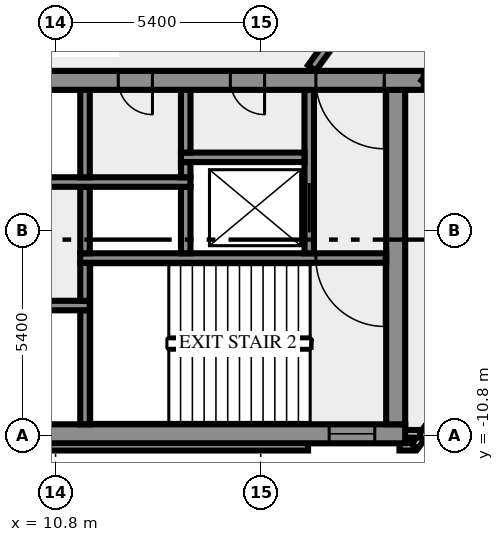
"""IFC4 building model, lengths in metres.
Left out: names, types, materials, properties, quantities, classifications, styles, units other than length and angle.
Written with IfcOpenShell. Run it as: python <this file> out.ifc"""

import sys

from ifc_helpers import new_model, si_unit, direction, frame, frame_2d, origin, place, context, subcontext, project, spatial, rectangle, extrude, element, fill, save


model = new_model("IFC4")
c1 = context("Model", 3, precision=1e-05, world=origin(), true_north=direction((0.0, 1.0)))
c2 = subcontext(c1, "Body", "Model", "MODEL_VIEW")
j1 = project(units=[si_unit("LENGTHUNIT", "METRE"), si_unit("PLANEANGLEUNIT", "RADIAN")], contexts=[c1])
p1 = place(None, origin())
s1 = spatial("IfcSite", under=j1, at=p1, CompositionType="ELEMENT")
p2 = place(p1, origin())
s2 = spatial("IfcBuilding", under=s1, at=p2, CompositionType="ELEMENT")
p3 = place(p2, frame((0.0, 0.0, 31.0)))
s3 = spatial("IfcBuildingStorey", under=s2, at=p3, CompositionType="ELEMENT", Elevation=31.0)
p4 = place(p3, frame((-17.444, -11.088, 0.0), z_axis=(0.0, 0.0, 1.0), x_axis=(1.0, 0.0, 0.0)))
e1 = element("IfcWall", 1, at=p4, inside=s3, PredefinedType="SOLIDWALL", context=c2, shape_type="SweptSolid", body=[
    extrude(rectangle(XDim=34.888, YDim=0.2, at=frame_2d((17.444, 0.0))), origin(), (0.0, 0.0, 1.0), 3.65),
])
p5 = place(p3, frame((19.85, -11.088, 0.0), z_axis=(0.0, 0.0, 1.0), x_axis=(1.0, 0.0, 0.0)))
e2 = element("IfcWall", 2, at=p5, inside=s3, PredefinedType="SOLIDWALL", context=c2, shape_type="SweptSolid", body=[
    extrude(rectangle(XDim=0.406, YDim=0.2, at=frame_2d((0.203, 0.0))), origin(), (0.0, 0.0, 1.0), 3.65),
])
p6 = place(p3, frame((20.253, -11.083, 0.0), z_axis=(0.0, 0.0, 1.0), x_axis=(0.587766567315, 0.809030569476, 0.0)))
e3 = element("IfcWall", 3, at=p6, inside=s3, PredefinedType="SOLIDWALL", context=c2, shape_type="SweptSolid", body=[
    extrude(rectangle(XDim=2.688, YDim=0.2, at=frame_2d((1.344, 0.0))), origin(), (0.0, 0.0, 1.0), 3.65),
])
p7 = place(p3, frame((19.98, -10.75, 0.0), z_axis=(0.0, 0.0, 1.0), x_axis=(1.0, 0.0, 0.0)))
e4 = element("IfcWall", 4, at=p7, inside=s3, PredefinedType="SOLIDWALL", context=c2, shape_type="SweptSolid", body=[
    extrude(rectangle(XDim=0.417, YDim=0.2, at=frame_2d((0.208, 0.0))), origin(), (0.0, 0.0, 1.0), 3.65),
])
p8 = place(p3, frame((-20.0, -10.75, 0.0), z_axis=(0.0, 0.0, 1.0), x_axis=(1.0, 0.0, 0.0)))
e5 = element("IfcWall", 5, at=p8, inside=s3, PredefinedType="SHEAR", context=c2, shape_type="SweptSolid", body=[
    extrude(rectangle(XDim=40.0, YDim=0.5, at=frame_2d((20.0, 0.0))), origin(), (0.0, 0.0, 1.0), 3.65),
])
p9 = place(p8, frame((0.8, 0.0, 1.0)))
e6 = element("IfcOpeningElement", 6, at=p9, cuts=e5, PredefinedType="OPENING", context=c2, shape_type="SweptSolid", body=[
    extrude(rectangle(XDim=1.2, YDim=1.2, at=frame_2d((0.6, 0.6))), frame((0.0, 0.26, 0.0), z_axis=(0.0, -1.0, 0.0), x_axis=(1.0, 0.0, 0.0)), (0.0, 0.0, 1.0), 0.52),
])
p10 = place(p8, frame((38.0, 0.0, 1.0)))
e7 = element("IfcOpeningElement", 7, at=p10, cuts=e5, PredefinedType="OPENING", context=c2, shape_type="SweptSolid", body=[
    extrude(rectangle(XDim=1.2, YDim=1.2, at=frame_2d((0.6, 0.6))), frame((0.0, 0.26, 0.0), z_axis=(0.0, -1.0, 0.0), x_axis=(1.0, 0.0, 0.0)), (0.0, 0.0, 1.0), 0.52),
])
p11 = place(p3, frame((11.575, -10.5, 0.0), z_axis=(0.0, 0.0, 1.0), x_axis=(0.0, 1.0, 0.0)))
e8 = element("IfcWall", 8, at=p11, inside=s3, PredefinedType="SHEAR", context=c2, shape_type="SweptSolid", body=[
    extrude(rectangle(XDim=3.0, YDim=0.25, at=frame_2d((1.5, 0.0))), origin(), (0.0, 0.0, 1.0), 3.65),
])
p12 = place(p3, frame((19.75, -10.5, 0.0), z_axis=(0.0, 0.0, 1.0), x_axis=(0.0, 1.0, 0.0)))
e9 = element("IfcWall", 9, at=p12, inside=s3, PredefinedType="SHEAR", context=c2, shape_type="SweptSolid", body=[
    extrude(rectangle(XDim=8.8, YDim=0.5, at=frame_2d((4.4, 0.0))), origin(), (0.0, 0.0, 1.0), 3.65),
])
p13 = place(p3, frame((11.7, -7.375, 0.0), z_axis=(0.0, 0.0, 1.0), x_axis=(-1.0, 0.0, 0.0)))
e10 = element("IfcWall", 10, at=p13, inside=s3, PredefinedType="SHEAR", context=c2, shape_type="SweptSolid", body=[
    extrude(rectangle(XDim=23.4, YDim=0.25, at=frame_2d((11.7, 0.0))), origin(), (0.0, 0.0, 1.0), 3.65),
])
p14 = place(p13, frame((21.45, 0.0, 0.0)))
e11 = element("IfcOpeningElement", 11, at=p14, cuts=e10, PredefinedType="OPENING", context=c2, shape_type="SweptSolid", body=[
    extrude(rectangle(XDim=1.1, YDim=2.1, at=frame_2d((0.55, 1.05))), frame((0.0, 0.135, 0.0), z_axis=(0.0, -1.0, 0.0), x_axis=(1.0, 0.0, 0.0)), (0.0, 0.0, 1.0), 0.27),
])
p15 = place(p13, frame((18.95, 0.0, 0.0)))
e12 = element("IfcOpeningElement", 12, at=p15, cuts=e10, PredefinedType="OPENING", context=c2, shape_type="SweptSolid", body=[
    extrude(rectangle(XDim=1.1, YDim=2.1, at=frame_2d((0.55, 1.05))), frame((0.0, 0.135, 0.0), z_axis=(0.0, -1.0, 0.0), x_axis=(1.0, 0.0, 0.0)), (0.0, 0.0, 1.0), 0.27),
])
p16 = place(p13, frame((16.45, 0.0, 0.0)))
e13 = element("IfcOpeningElement", 13, at=p16, cuts=e10, PredefinedType="OPENING", context=c2, shape_type="SweptSolid", body=[
    extrude(rectangle(XDim=1.1, YDim=2.1, at=frame_2d((0.55, 1.05))), frame((0.0, 0.135, 0.0), z_axis=(0.0, -1.0, 0.0), x_axis=(1.0, 0.0, 0.0)), (0.0, 0.0, 1.0), 0.27),
])
p17 = place(p13, frame((14.4, 0.0, 0.0)))
e14 = element("IfcOpeningElement", 14, at=p17, cuts=e10, PredefinedType="OPENING", context=c2, shape_type="SweptSolid", body=[
    extrude(rectangle(XDim=0.9, YDim=2.1, at=frame_2d((0.45, 1.05))), frame((0.0, 0.135, 0.0), z_axis=(0.0, -1.0, 0.0), x_axis=(1.0, 0.0, 0.0)), (0.0, 0.0, 1.0), 0.27),
])
p18 = place(p13, frame((12.5, 0.0, 0.0)))
e15 = element("IfcOpeningElement", 15, at=p18, cuts=e10, PredefinedType="OPENING", context=c2, shape_type="SweptSolid", body=[
    extrude(rectangle(XDim=0.9, YDim=2.1, at=frame_2d((0.45, 1.05))), frame((0.0, 0.135, 0.0), z_axis=(0.0, -1.0, 0.0), x_axis=(1.0, 0.0, 0.0)), (0.0, 0.0, 1.0), 0.27),
])
p19 = place(p13, frame((10.6, 0.0, 0.0)))
e16 = element("IfcOpeningElement", 16, at=p19, cuts=e10, PredefinedType="OPENING", context=c2, shape_type="SweptSolid", body=[
    extrude(rectangle(XDim=0.9, YDim=2.1, at=frame_2d((0.45, 1.05))), frame((0.0, 0.135, 0.0), z_axis=(0.0, -1.0, 0.0), x_axis=(1.0, 0.0, 0.0)), (0.0, 0.0, 1.0), 0.27),
])
p20 = place(p3, frame((11.575, -7.25, 0.0), z_axis=(0.0, 0.0, 1.0), x_axis=(0.0, 1.0, 0.0)))
e17 = element("IfcWall", 17, at=p20, inside=s3, PredefinedType="SHEAR", context=c2, shape_type="SweptSolid", body=[
    extrude(rectangle(XDim=1.0, YDim=0.25, at=frame_2d((0.5, 0.0))), origin(), (0.0, 0.0, 1.0), 3.65),
])
p21 = place(p3, frame((19.5, -6.125, 0.0), z_axis=(0.0, 0.0, 1.0), x_axis=(-1.0, 0.0, 0.0)))
e18 = element("IfcWall", 18, at=p21, inside=s3, PredefinedType="SHEAR", context=c2, shape_type="SweptSolid", body=[
    extrude(rectangle(XDim=8.05, YDim=0.25, at=frame_2d((4.025, 0.0))), origin(), (0.0, 0.0, 1.0), 3.65),
])
p22 = place(p21, frame((0.05, 0.0, 0.0)))
e19 = element("IfcOpeningElement", 19, at=p22, cuts=e18, PredefinedType="OPENING", context=c2, shape_type="SweptSolid", body=[
    extrude(rectangle(XDim=1.8, YDim=2.1, at=frame_2d((0.9, 1.05))), frame((0.0, 0.135, 0.0), z_axis=(0.0, -1.0, 0.0), x_axis=(1.0, 0.0, 0.0)), (0.0, 0.0, 1.0), 0.27),
])
for number, where, z_axis, x_axis in (
    (20, (11.575, -6.0, 0.0), (0.0, 0.0, 1.0), (0.0, 1.0, 0.0)),
    (21, (14.225, -6.0, 0.0), (0.0, 0.0, 1.0), (0.0, 1.0, 0.0)),
):
    element("IfcWall", number, at=place(p3, frame(where, z_axis=z_axis, x_axis=x_axis)), inside=s3, PredefinedType="SHEAR", context=c2, shape_type="SweptSolid", body=[
        extrude(rectangle(XDim=1.75, YDim=0.25, at=frame_2d((0.875, 0.0))), origin(), (0.0, 0.0, 1.0), 3.65),
    ])
p23 = place(p3, frame((17.475, -6.0, 0.0), z_axis=(0.0, 0.0, 1.0), x_axis=(0.0, 1.0, 0.0)))
e22 = element("IfcWall", 22, at=p23, inside=s3, PredefinedType="SHEAR", context=c2, shape_type="SweptSolid", body=[
    extrude(rectangle(XDim=4.3, YDim=0.25, at=frame_2d((2.15, 0.0))), origin(), (0.0, 0.0, 1.0), 3.65),
])
p24 = place(p23, frame((0.55, 0.0, 0.0)))
e23 = element("IfcOpeningElement", 23, at=p24, cuts=e22, PredefinedType="OPENING", context=c2, shape_type="SweptSolid", body=[
    extrude(rectangle(XDim=1.3, YDim=2.1, at=frame_2d((0.65, 1.05))), frame((0.0, 0.135, 0.0), z_axis=(0.0, -1.0, 0.0), x_axis=(1.0, 0.0, 0.0)), (0.0, 0.0, 1.0), 0.27),
])
p25 = place(p3, frame((-0.6, -4.125, 0.0), z_axis=(0.0, 0.0, 1.0), x_axis=(1.0, 0.0, 0.0)))
e24 = element("IfcWall", 24, at=p25, inside=s3, PredefinedType="SHEAR", context=c2, shape_type="SweptSolid", body=[
    extrude(rectangle(XDim=14.95, YDim=0.25, at=frame_2d((7.475, 0.0))), origin(), (0.0, 0.0, 1.0), 3.65),
])
p26 = place(p25, frame((2.75, 0.0, 0.0)))
e25 = element("IfcOpeningElement", 25, at=p26, cuts=e24, PredefinedType="OPENING", context=c2, shape_type="SweptSolid", body=[
    extrude(rectangle(XDim=1.3, YDim=2.1, at=frame_2d((0.65, 1.05))), frame((0.0, 0.135, 0.0), z_axis=(0.0, -1.0, 0.0), x_axis=(1.0, 0.0, 0.0)), (0.0, 0.0, 1.0), 0.27),
])
p27 = place(p3, frame((11.575, -4.0, 0.0), z_axis=(0.0, 0.0, 1.0), x_axis=(0.0, 1.0, 0.0)))
e26 = element("IfcWall", 26, at=p27, inside=s3, PredefinedType="SHEAR", context=c2, shape_type="SweptSolid", body=[
    extrude(rectangle(XDim=2.3, YDim=0.25, at=frame_2d((1.15, 0.0))), origin(), (0.0, 0.0, 1.0), 3.65),
])
p28 = place(p3, frame((14.225, -4.0, 0.0), z_axis=(0.0, 0.0, 1.0), x_axis=(0.0, 1.0, 0.0)))
e27 = element("IfcWall", 27, at=p28, inside=s3, PredefinedType="SHEAR", context=c2, shape_type="SweptSolid", body=[
    extrude(rectangle(XDim=0.4, YDim=0.25, at=frame_2d((0.2, 0.0))), origin(), (0.0, 0.0, 1.0), 3.65),
])
p29 = place(p3, frame((14.1, -3.475, 0.0), z_axis=(0.0, 0.0, 1.0), x_axis=(1.0, 0.0, 0.0)))
e28 = element("IfcWall", 28, at=p29, inside=s3, PredefinedType="SHEAR", context=c2, shape_type="SweptSolid", body=[
    extrude(rectangle(XDim=3.25, YDim=0.25, at=frame_2d((1.625, 0.0))), origin(), (0.0, 0.0, 1.0), 3.65),
])
p30 = place(p3, frame((14.225, -3.35, 0.0), z_axis=(0.0, 0.0, 1.0), x_axis=(0.0, 1.0, 0.0)))
e29 = element("IfcWall", 29, at=p30, inside=s3, PredefinedType="SHEAR", context=c2, shape_type="SweptSolid", body=[
    extrude(rectangle(XDim=1.65, YDim=0.25, at=frame_2d((0.825, 0.0))), origin(), (0.0, 0.0, 1.0), 3.65),
])
p31 = place(p3, frame((20.49, -1.45, 0.0), z_axis=(0.0, 0.0, 1.0), x_axis=(-1.0, 0.0, 0.0)))
e30 = element("IfcWall", 30, at=p31, inside=s3, PredefinedType="SHEAR", context=c2, shape_type="SweptSolid", body=[
    extrude(rectangle(XDim=40.98, YDim=0.5, at=frame_2d((20.49, 0.0))), origin(), (0.0, 0.0, 1.0), 3.65),
])
p32 = place(p31, frame((38.14, 0.0, 0.0)))
e31 = element("IfcOpeningElement", 31, at=p32, cuts=e30, PredefinedType="OPENING", context=c2, shape_type="SweptSolid", body=[
    extrude(rectangle(XDim=1.8, YDim=2.1, at=frame_2d((0.9, 1.05))), frame((0.0, 0.26, 0.0), z_axis=(0.0, -1.0, 0.0), x_axis=(1.0, 0.0, 0.0)), (0.0, 0.0, 1.0), 0.52),
])
p33 = place(p31, frame((36.728, 0.0, 0.0)))
e32 = element("IfcOpeningElement", 32, at=p33, cuts=e30, PredefinedType="OPENING", context=c2, shape_type="SweptSolid", body=[
    extrude(rectangle(XDim=0.8, YDim=2.1, at=frame_2d((0.4, 1.05))), frame((0.0, 0.26, 0.0), z_axis=(0.0, -1.0, 0.0), x_axis=(1.0, 0.0, 0.0)), (0.0, 0.0, 1.0), 0.52),
])
p34 = place(p31, frame((35.153, 0.0, 0.0)))
e33 = element("IfcOpeningElement", 33, at=p34, cuts=e30, PredefinedType="OPENING", context=c2, shape_type="SweptSolid", body=[
    extrude(rectangle(XDim=0.8, YDim=2.1, at=frame_2d((0.4, 1.05))), frame((0.0, 0.26, 0.0), z_axis=(0.0, -1.0, 0.0), x_axis=(1.0, 0.0, 0.0)), (0.0, 0.0, 1.0), 0.52),
])
p35 = place(p31, frame((32.94, 0.0, 0.0)))
e34 = element("IfcOpeningElement", 34, at=p35, cuts=e30, PredefinedType="OPENING", context=c2, shape_type="SweptSolid", body=[
    extrude(rectangle(XDim=0.9, YDim=2.1, at=frame_2d((0.45, 1.05))), frame((0.0, 0.26, 0.0), z_axis=(0.0, -1.0, 0.0), x_axis=(1.0, 0.0, 0.0)), (0.0, 0.0, 1.0), 0.52),
])
p36 = place(p31, frame((21.765, 0.0, 0.0)))
e35 = element("IfcOpeningElement", 35, at=p36, cuts=e30, PredefinedType="OPENING", context=c2, shape_type="SweptSolid", body=[
    extrude(rectangle(XDim=2.0, YDim=2.1, at=frame_2d((1.0, 1.05))), frame((0.0, 0.26, 0.0), z_axis=(0.0, -1.0, 0.0), x_axis=(1.0, 0.0, 0.0)), (0.0, 0.0, 1.0), 0.52),
])
p37 = place(p31, frame((7.14, 0.0, 0.0)))
e36 = element("IfcOpeningElement", 36, at=p37, cuts=e30, PredefinedType="OPENING", context=c2, shape_type="SweptSolid", body=[
    extrude(rectangle(XDim=0.9, YDim=2.1, at=frame_2d((0.45, 1.05))), frame((0.0, 0.26, 0.0), z_axis=(0.0, -1.0, 0.0), x_axis=(1.0, 0.0, 0.0)), (0.0, 0.0, 1.0), 0.52),
])
p38 = place(p31, frame((4.19, 0.0, 0.0)))
e37 = element("IfcOpeningElement", 37, at=p38, cuts=e30, PredefinedType="OPENING", context=c2, shape_type="SweptSolid", body=[
    extrude(rectangle(XDim=0.9, YDim=2.1, at=frame_2d((0.45, 1.05))), frame((0.0, 0.26, 0.0), z_axis=(0.0, -1.0, 0.0), x_axis=(1.0, 0.0, 0.0)), (0.0, 0.0, 1.0), 0.52),
])
p39 = place(p31, frame((1.04, 0.0, 0.0)))
e38 = element("IfcOpeningElement", 38, at=p39, cuts=e30, PredefinedType="OPENING", context=c2, shape_type="SweptSolid", body=[
    extrude(rectangle(XDim=1.8, YDim=2.1, at=frame_2d((0.9, 1.05))), frame((0.0, 0.26, 0.0), z_axis=(0.0, -1.0, 0.0), x_axis=(1.0, 0.0, 0.0)), (0.0, 0.0, 1.0), 0.52),
])
p40 = place(p3, frame((17.545, -1.125, 0.0), z_axis=(0.0, 0.0, 1.0), x_axis=(0.587786323093, 0.809016216391, 0.0)))
e39 = element("IfcWall", 39, at=p40, inside=s3, PredefinedType="SOLIDWALL", context=c2, shape_type="SweptSolid", body=[
    extrude(rectangle(XDim=33.493, YDim=0.25, at=frame_2d((16.747, 0.0))), origin(), (0.0, 0.0, 1.0), 3.65),
])
p41 = place(p40, frame((25.857, 0.0, 0.0)))
e40 = element("IfcOpeningElement", 40, at=p41, cuts=e39, PredefinedType="OPENING", context=c2, shape_type="SweptSolid", body=[
    extrude(rectangle(XDim=0.9, YDim=2.1, at=frame_2d((0.45, 1.05))), frame((0.0, 0.135, 0.0), z_axis=(0.0, -1.0, 0.0), x_axis=(1.0, 0.0, 0.0)), (0.0, 0.0, 1.0), 0.27),
])
p42 = place(p40, frame((24.157, 0.0, 0.0)))
e41 = element("IfcOpeningElement", 41, at=p42, cuts=e39, PredefinedType="OPENING", context=c2, shape_type="SweptSolid", body=[
    extrude(rectangle(XDim=1.0, YDim=2.1, at=frame_2d((0.5, 1.05))), frame((0.0, 0.135, 0.0), z_axis=(0.0, -1.0, 0.0), x_axis=(1.0, 0.0, 0.0)), (0.0, 0.0, 1.0), 0.27),
])
p43 = place(p3, frame((43.467, 30.045, 0.0), z_axis=(0.0, 0.0, 1.0), x_axis=(-0.587784726077, -0.809017376692, 0.0)))
e42 = element("IfcWall", 42, at=p43, inside=s3, PredefinedType="SOLIDWALL", context=c2, shape_type="SweptSolid", body=[
    extrude(rectangle(XDim=39.02, YDim=0.25, at=frame_2d((19.51, 0.0))), origin(), (0.0, 0.0, 1.0), 3.65),
])
p44 = place(p43, frame((37.588, 0.0, 0.0)))
e43 = element("IfcOpeningElement", 43, at=p44, cuts=e42, PredefinedType="OPENING", context=c2, shape_type="SweptSolid", body=[
    extrude(rectangle(XDim=0.9, YDim=2.1, at=frame_2d((0.45, 1.05))), frame((0.0, 0.135, 0.0), z_axis=(0.0, -1.0, 0.0), x_axis=(1.0, 0.0, 0.0)), (0.0, 0.0, 1.0), 0.27),
])
p45 = place(p43, frame((20.855, 0.0, 0.0)))
e44 = element("IfcOpeningElement", 44, at=p45, cuts=e42, PredefinedType="OPENING", context=c2, shape_type="SweptSolid", body=[
    extrude(rectangle(XDim=0.9, YDim=2.1, at=frame_2d((0.45, 1.05))), frame((0.0, 0.135, 0.0), z_axis=(0.0, -1.0, 0.0), x_axis=(1.0, 0.0, 0.0)), (0.0, 0.0, 1.0), 0.27),
])
p46 = place(p43, frame((7.355, 0.0, 0.0)))
e45 = element("IfcOpeningElement", 45, at=p46, cuts=e42, PredefinedType="OPENING", context=c2, shape_type="SweptSolid", body=[
    extrude(rectangle(XDim=0.9, YDim=2.1, at=frame_2d((0.45, 1.05))), frame((0.0, 0.135, 0.0), z_axis=(0.0, -1.0, 0.0), x_axis=(1.0, 0.0, 0.0)), (0.0, 0.0, 1.0), 0.27),
])
p47 = place(p43, frame((11.404, 0.0, 0.0)))
e46 = element("IfcOpeningElement", 46, at=p47, cuts=e42, PredefinedType="OPENING", context=c2, shape_type="SweptSolid", body=[
    extrude(rectangle(XDim=0.9, YDim=2.1, at=frame_2d((0.45, 1.05))), frame((0.0, 0.135, 0.0), z_axis=(0.0, -1.0, 0.0), x_axis=(1.0, 0.0, 0.0)), (0.0, 0.0, 1.0), 0.27),
])
p48 = place(p43, frame((0.604, 0.0, 0.0)))
e47 = element("IfcOpeningElement", 47, at=p48, cuts=e42, PredefinedType="OPENING", context=c2, shape_type="SweptSolid", body=[
    extrude(rectangle(XDim=0.9, YDim=2.1, at=frame_2d((0.45, 1.05))), frame((0.0, 0.135, 0.0), z_axis=(0.0, -1.0, 0.0), x_axis=(1.0, 0.0, 0.0)), (0.0, 0.0, 1.0), 0.27),
])
p49 = place(p43, frame((22.455, 0.0, 0.0)))
e48 = element("IfcOpeningElement", 48, at=p49, cuts=e42, PredefinedType="OPENING", context=c2, shape_type="SweptSolid", body=[
    extrude(rectangle(XDim=0.9, YDim=2.1, at=frame_2d((0.45, 1.05))), frame((0.0, 0.135, 0.0), z_axis=(0.0, -1.0, 0.0), x_axis=(1.0, 0.0, 0.0)), (0.0, 0.0, 1.0), 0.27),
])
p50 = place(p10, origin())
e49 = element("IfcWindow", 49, at=p50, inside=s3, PartitioningType="SINGLE_PANEL", PredefinedType="WINDOW", context=c2, shape_type="SweptSolid", body=[
    extrude(rectangle(XDim=1.2, YDim=1.2, at=frame_2d((0.6, 0.6))), frame((0.0, 0.03, 0.0), z_axis=(0.0, -1.0, 0.0), x_axis=(1.0, 0.0, 0.0)), (0.0, 0.0, 1.0), 0.06),
])
fill(e7, e49)
p51 = place(p22, origin())
e50 = element("IfcDoor", 50, at=p51, inside=s3, OperationType="DOUBLE_DOOR_SINGLE_SWING", PredefinedType="DOOR", context=c2, shape_type="SweptSolid", body=[
    extrude(rectangle(XDim=1.8, YDim=2.1, at=frame_2d((0.9, 1.05))), frame((0.0, 0.025, 0.0), z_axis=(0.0, -1.0, 0.0), x_axis=(1.0, 0.0, 0.0)), (0.0, 0.0, 1.0), 0.05),
])
fill(e19, e50)
p52 = place(p24, origin())
e51 = element("IfcDoor", 51, at=p52, inside=s3, OperationType="DOUBLE_DOOR_SLIDING", PredefinedType="DOOR", context=c2, shape_type="SweptSolid", body=[
    extrude(rectangle(XDim=1.3, YDim=2.1, at=frame_2d((0.65, 1.05))), frame((0.0, 0.025, 0.0), z_axis=(0.0, -1.0, 0.0), x_axis=(1.0, 0.0, 0.0)), (0.0, 0.0, 1.0), 0.05),
])
fill(e23, e51)
p53 = place(p37, origin())
e52 = element("IfcDoor", 52, at=p53, inside=s3, OperationType="SINGLE_SWING_LEFT", PredefinedType="DOOR", context=c2, shape_type="SweptSolid", body=[
    extrude(rectangle(XDim=0.9, YDim=2.1, at=frame_2d((0.45, 1.05))), frame((0.0, 0.025, 0.0), z_axis=(0.0, -1.0, 0.0), x_axis=(1.0, 0.0, 0.0)), (0.0, 0.0, 1.0), 0.05),
])
fill(e36, e52)
p54 = place(p38, origin())
e53 = element("IfcDoor", 53, at=p54, inside=s3, OperationType="SINGLE_SWING_LEFT", PredefinedType="DOOR", context=c2, shape_type="SweptSolid", body=[
    extrude(rectangle(XDim=0.9, YDim=2.1, at=frame_2d((0.45, 1.05))), frame((0.0, 0.025, 0.0), z_axis=(0.0, -1.0, 0.0), x_axis=(1.0, 0.0, 0.0)), (0.0, 0.0, 1.0), 0.05),
])
fill(e37, e53)
p55 = place(p39, origin())
e54 = element("IfcDoor", 54, at=p55, inside=s3, OperationType="DOUBLE_DOOR_SINGLE_SWING", PredefinedType="DOOR", context=c2, shape_type="SweptSolid", body=[
    extrude(rectangle(XDim=1.8, YDim=2.1, at=frame_2d((0.9, 1.05))), frame((0.0, 0.025, 0.0), z_axis=(0.0, -1.0, 0.0), x_axis=(1.0, 0.0, 0.0)), (0.0, 0.0, 1.0), 0.05),
])
fill(e38, e54)
save(model, sys.argv[1])
